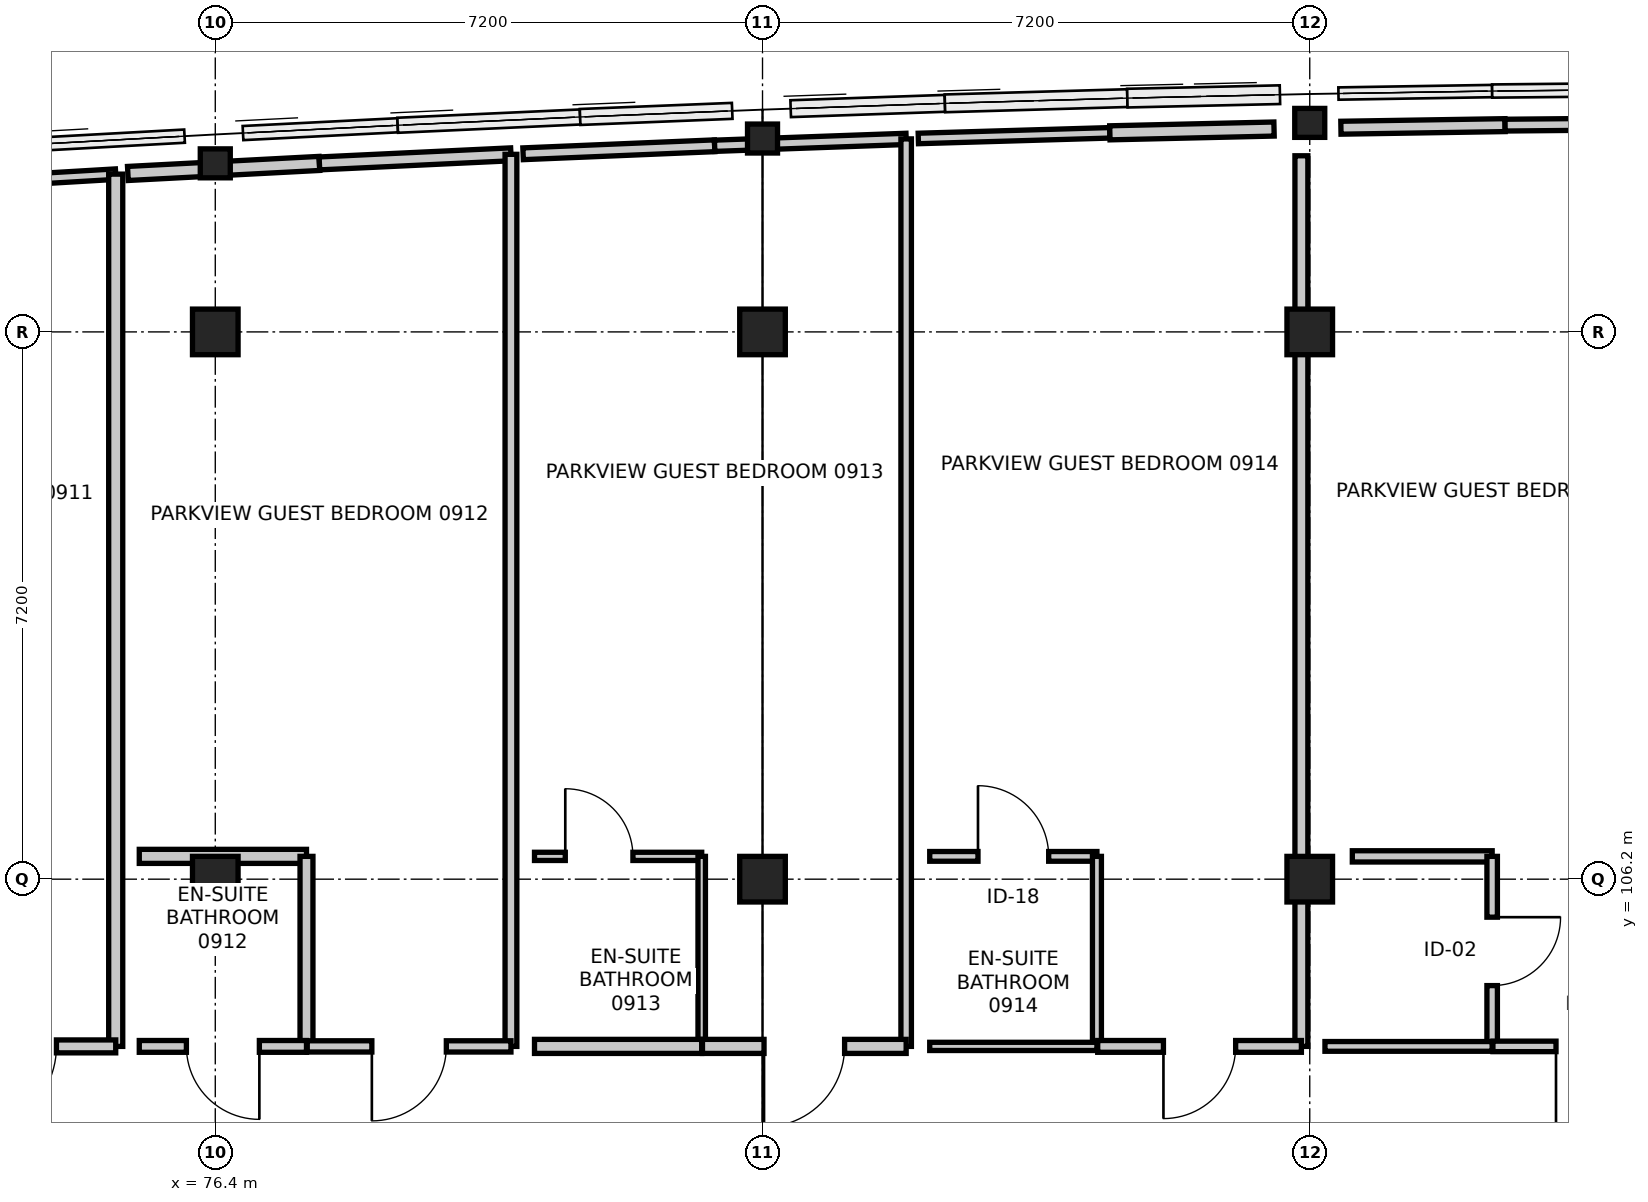
"""IFC4 building model, lengths in metres.
Left out: names, types, materials, properties, quantities, classifications, styles, units other than length and angle.
Written with IfcOpenShell. Run it as: python <this file> out.ifc"""

import sys

from ifc_helpers import new_model, si_unit, direction, frame, frame_2d, origin, origin_2d, place, context, subcontext, project, spatial, rectangle, i_section, extrude, element, fill, save


model = new_model("IFC4")
c1 = context("Model", 3, precision=1e-05, world=origin(), true_north=direction((0.0, 1.0)))
c2 = subcontext(c1, "Body", "Model", "MODEL_VIEW")
j1 = project(units=[si_unit("LENGTHUNIT", "METRE"), si_unit("PLANEANGLEUNIT", "RADIAN")], contexts=[c1])
p1 = place(None, origin())
s1 = spatial("IfcSite", under=j1, at=p1, CompositionType="ELEMENT")
p2 = place(p1, origin())
s2 = spatial("IfcBuilding", under=s1, at=p2, CompositionType="ELEMENT")
p3 = place(p2, frame((0.0, 0.0, 37.2)))
s3 = spatial("IfcBuildingStorey", under=s2, at=p3, CompositionType="ELEMENT", Elevation=37.2)
for number, where, z_axis, x_axis in (
    (1, (76.4, 106.2, 0.0), (0.0, 0.0, 1.0), (1.0, 0.0, 0.0)),
    (2, (76.4, 113.4, 0.0), (0.0, 0.0, 1.0), (1.0, 0.0, 0.0)),
):
    element("IfcColumn", number, at=place(p3, frame(where, z_axis=z_axis, x_axis=x_axis)), inside=s3, PredefinedType="COLUMN", context=c2, shape_type="SweptSolid", body=[
        extrude(rectangle(XDim=0.6, YDim=0.6, at=origin_2d()), origin(), (0.0, 0.0, 1.0), 3.6),
    ])
p4 = place(p3, frame((76.4, 115.618, 0.0), z_axis=(0.0, 0.0, 1.0), x_axis=(1.0, 0.0, 0.0)))
e3 = element("IfcColumn", 3, at=p4, inside=s3, PredefinedType="COLUMN", context=c2, shape_type="SweptSolid", body=[
    extrude(i_section(OverallWidth=0.395, OverallDepth=0.381, WebThickness=0.018, FlangeThickness=0.03, FilletRadius=0.015, at=origin_2d()), origin(), (0.0, 0.0, 1.0), 3.6),
])
for number, where, z_axis, x_axis in (
    (4, (83.6, 106.2, 0.0), (0.0, 0.0, 1.0), (1.0, 0.0, 0.0)),
    (5, (83.6, 113.4, 0.0), (0.0, 0.0, 1.0), (1.0, 0.0, 0.0)),
):
    element("IfcColumn", number, at=place(p3, frame(where, z_axis=z_axis, x_axis=x_axis)), inside=s3, PredefinedType="COLUMN", context=c2, shape_type="SweptSolid", body=[
        extrude(rectangle(XDim=0.6, YDim=0.6, at=origin_2d()), origin(), (0.0, 0.0, 1.0), 3.6),
    ])
p5 = place(p3, frame((83.6, 115.944, 0.0), z_axis=(0.0, 0.0, 1.0), x_axis=(1.0, 0.0, 0.0)))
e6 = element("IfcColumn", 6, at=p5, inside=s3, PredefinedType="COLUMN", context=c2, shape_type="SweptSolid", body=[
    extrude(i_section(OverallWidth=0.395, OverallDepth=0.381, WebThickness=0.018, FlangeThickness=0.03, FilletRadius=0.015, at=origin_2d()), origin(), (0.0, 0.0, 1.0), 3.6),
])
for number, where, z_axis, x_axis in (
    (7, (90.8, 106.2, 0.0), (0.0, 0.0, 1.0), (1.0, 0.0, 0.0)),
    (8, (90.8, 113.4, 0.0), (0.0, 0.0, 1.0), (1.0, 0.0, 0.0)),
):
    element("IfcColumn", number, at=place(p3, frame(where, z_axis=z_axis, x_axis=x_axis)), inside=s3, PredefinedType="COLUMN", context=c2, shape_type="SweptSolid", body=[
        extrude(rectangle(XDim=0.6, YDim=0.6, at=origin_2d()), origin(), (0.0, 0.0, 1.0), 3.6),
    ])
p6 = place(p3, frame((90.8, 116.15, 0.0), z_axis=(0.0, 0.0, 1.0), x_axis=(1.0, 0.0, 0.0)))
e9 = element("IfcColumn", 9, at=p6, inside=s3, PredefinedType="COLUMN", context=c2, shape_type="SweptSolid", body=[
    extrude(i_section(OverallWidth=0.395, OverallDepth=0.381, WebThickness=0.018, FlangeThickness=0.03, FilletRadius=0.015, at=origin_2d()), origin(), (0.0, 0.0, 1.0), 3.6),
])
p7 = place(p3, frame((70.05, 115.177, 0.0), z_axis=(0.0, 0.0, 1.0), x_axis=(0.998255479729, 0.059042333886, 0.0)))
e10 = element("IfcWall", 10, at=p7, inside=s3, PredefinedType="PARTITIONING", context=c2, shape_type="SweptSolid", body=[
    extrude(rectangle(XDim=5.049, YDim=0.138, at=frame_2d((2.524, 0.0))), origin(), (0.0, 0.0, 1.0), 2.956),
])
p8 = place(p3, frame((75.09, 115.476, 0.0), z_axis=(0.0, 0.0, 1.0), x_axis=(0.0, -1.0, 0.0)))
e11 = element("IfcWall", 11, at=p8, inside=s3, PredefinedType="PARTITIONING", context=c2, shape_type="SweptSolid", body=[
    extrude(rectangle(XDim=11.476, YDim=0.185, at=frame_2d((5.738, 0.0))), origin(), (0.0, 0.0, 1.0), 2.765),
])
p9 = place(p3, frame((75.09, 104.0, 0.0), z_axis=(0.0, 0.0, 1.0), x_axis=(-1.0, 0.0, 0.0)))
e12 = element("IfcWall", 12, at=p9, inside=s3, PredefinedType="PARTITIONING", context=c2, shape_type="SweptSolid", body=[
    extrude(rectangle(XDim=2.68, YDim=0.17, at=frame_2d((1.34, 0.0))), origin(), (0.0, 0.0, 1.0), 3.38),
])
p10 = place(p9, frame((0.78, 0.0, 0.0)))
e13 = element("IfcOpeningElement", 13, at=p10, cuts=e12, PredefinedType="OPENING", context=c2, shape_type="SweptSolid", body=[
    extrude(rectangle(XDim=1.12, YDim=2.2, at=frame_2d((0.56, 1.1))), frame((0.0, 0.095, 0.0), z_axis=(0.0, -1.0, 0.0), x_axis=(1.0, 0.0, 0.0)), (0.0, 0.0, 1.0), 0.19),
])
p11 = place(p3, frame((75.4, 106.5, 0.0), z_axis=(0.0, 0.0, 1.0), x_axis=(1.0, 0.0, 0.0)))
e14 = element("IfcWall", 14, at=p11, inside=s3, PredefinedType="PARTITIONING", context=c2, shape_type="SweptSolid", body=[
    extrude(rectangle(XDim=2.2, YDim=0.185, at=frame_2d((1.1, 0.0))), origin(), (0.0, 0.0, 1.0), 2.715),
])
p12 = place(p3, frame((77.6, 106.5, 0.0), z_axis=(0.0, 0.0, 1.0), x_axis=(0.0, -1.0, 0.0)))
e15 = element("IfcWall", 15, at=p12, inside=s3, PredefinedType="PARTITIONING", context=c2, shape_type="SweptSolid", body=[
    extrude(rectangle(XDim=2.5, YDim=0.17, at=frame_2d((1.25, 0.0))), origin(), (0.0, 0.0, 1.0), 2.765),
])
p13 = place(p3, frame((77.6, 104.0, 0.0), z_axis=(0.0, 0.0, 1.0), x_axis=(-1.0, 0.0, 0.0)))
e16 = element("IfcWall", 16, at=p13, inside=s3, PredefinedType="PARTITIONING", context=c2, shape_type="SweptSolid", body=[
    extrude(rectangle(XDim=2.2, YDim=0.155, at=frame_2d((1.1, 0.0))), origin(), (0.0, 0.0, 1.0), 2.715),
])
p14 = place(p13, frame((0.62, 0.0, 0.0)))
e17 = element("IfcOpeningElement", 17, at=p14, cuts=e16, PredefinedType="OPENING", context=c2, shape_type="SweptSolid", body=[
    extrude(rectangle(XDim=0.96, YDim=2.14, at=frame_2d((0.48, 1.07))), frame((0.0, 0.087, 0.0), z_axis=(0.0, -1.0, 0.0), x_axis=(1.0, 0.0, 0.0)), (0.0, 0.0, 1.0), 0.175),
])
p15 = place(p3, frame((75.25, 115.484, 0.0), z_axis=(0.0, 0.0, 1.0), x_axis=(0.998624236073, 0.052436963374, 0.0)))
e18 = element("IfcWall", 18, at=p15, inside=s3, PredefinedType="PARTITIONING", context=c2, shape_type="SweptSolid", body=[
    extrude(rectangle(XDim=2.523, YDim=0.185, at=frame_2d((1.262, 0.0))), origin(), (0.0, 0.0, 1.0), 2.956),
])
p16 = place(p3, frame((77.77, 115.617, 0.0), z_axis=(0.0, 0.0, 1.0), x_axis=(0.998875132968, 0.047418021232, 0.0)))
e19 = element("IfcWall", 19, at=p16, inside=s3, PredefinedType="PARTITIONING", context=c2, shape_type="SweptSolid", body=[
    extrude(rectangle(XDim=2.523, YDim=0.17, at=frame_2d((1.261, 0.0))), origin(), (0.0, 0.0, 1.0), 2.956),
])
p17 = place(p3, frame((80.29, 115.736, 0.0), z_axis=(0.0, 0.0, 1.0), x_axis=(0.0, -1.0, 0.0)))
e20 = element("IfcWall", 20, at=p17, inside=s3, PredefinedType="PARTITIONING", context=c2, shape_type="SweptSolid", body=[
    extrude(rectangle(XDim=11.736, YDim=0.155, at=frame_2d((5.868, 0.0))), origin(), (0.0, 0.0, 1.0), 2.765),
])
p18 = place(p3, frame((80.29, 104.0, 0.0), z_axis=(0.0, 0.0, 1.0), x_axis=(-1.0, 0.0, 0.0)))
e21 = element("IfcWall", 21, at=p18, inside=s3, PredefinedType="PARTITIONING", context=c2, shape_type="SweptSolid", body=[
    extrude(rectangle(XDim=2.68, YDim=0.148, at=frame_2d((1.34, 0.0))), origin(), (0.0, 0.0, 1.0), 3.38),
])
p19 = place(p18, frame((0.85, 0.0, 0.0)))
e22 = element("IfcOpeningElement", 22, at=p19, cuts=e21, PredefinedType="OPENING", context=c2, shape_type="SweptSolid", body=[
    extrude(rectangle(XDim=0.98, YDim=2.15, at=frame_2d((0.49, 1.075))), frame((0.0, 0.084, 0.0), z_axis=(0.0, -1.0, 0.0), x_axis=(1.0, 0.0, 0.0)), (0.0, 0.0, 1.0), 0.168),
])
p20 = place(p3, frame((80.6, 106.5, 0.0), z_axis=(0.0, 0.0, 1.0), x_axis=(1.0, 0.0, 0.0)))
e23 = element("IfcWall", 23, at=p20, inside=s3, PredefinedType="PARTITIONING", context=c2, shape_type="SweptSolid", body=[
    extrude(rectangle(XDim=2.2, YDim=0.108, at=frame_2d((1.1, 0.0))), origin(), (0.0, 0.0, 1.0), 3.38),
])
p21 = place(p20, frame((0.405, 0.0, 0.0)))
e24 = element("IfcOpeningElement", 24, at=p21, cuts=e23, PredefinedType="OPENING", context=c2, shape_type="SweptSolid", body=[
    extrude(rectangle(XDim=0.89, YDim=2.09, at=frame_2d((0.445, 1.045))), frame((0.0, 0.064, 0.0), z_axis=(0.0, -1.0, 0.0), x_axis=(1.0, 0.0, 0.0)), (0.0, 0.0, 1.0), 0.128),
])
p22 = place(p3, frame((82.8, 106.5, 0.0), z_axis=(0.0, 0.0, 1.0), x_axis=(0.0, -1.0, 0.0)))
e25 = element("IfcWall", 25, at=p22, inside=s3, PredefinedType="PARTITIONING", context=c2, shape_type="SweptSolid", body=[
    extrude(rectangle(XDim=2.5, YDim=0.098, at=frame_2d((1.25, 0.0))), origin(), (0.0, 0.0, 1.0), 2.765),
])
p23 = place(p3, frame((82.8, 104.0, 0.0), z_axis=(0.0, 0.0, 1.0), x_axis=(-1.0, 0.0, 0.0)))
e26 = element("IfcWall", 26, at=p23, inside=s3, PredefinedType="PARTITIONING", context=c2, shape_type="SweptSolid", body=[
    extrude(rectangle(XDim=2.2, YDim=0.185, at=frame_2d((1.1, 0.0))), origin(), (0.0, 0.0, 1.0), 3.38),
])
p24 = place(p3, frame((80.45, 115.743, 0.0), z_axis=(0.0, 0.0, 1.0), x_axis=(0.9991293785, 0.041719120532, 0.0)))
e27 = element("IfcWall", 27, at=p24, inside=s3, PredefinedType="PARTITIONING", context=c2, shape_type="SweptSolid", body=[
    extrude(rectangle(XDim=2.522, YDim=0.155, at=frame_2d((1.261, 0.0))), origin(), (0.0, 0.0, 1.0), 2.956),
])
p25 = place(p3, frame((82.97, 115.849, 0.0), z_axis=(0.0, 0.0, 1.0), x_axis=(0.99935468825, 0.035919452562, 0.0)))
e28 = element("IfcWall", 28, at=p25, inside=s3, PredefinedType="PARTITIONING", context=c2, shape_type="SweptSolid", body=[
    extrude(rectangle(XDim=2.522, YDim=0.148, at=frame_2d((1.261, 0.0))), origin(), (0.0, 0.0, 1.0), 2.956),
])
p26 = place(p3, frame((85.49, 115.939, 0.0), z_axis=(0.0, 0.0, 1.0), x_axis=(0.0, -1.0, 0.0)))
e29 = element("IfcWall", 29, at=p26, inside=s3, PredefinedType="PARTITIONING", context=c2, shape_type="SweptSolid", body=[
    extrude(rectangle(XDim=11.939, YDim=0.138, at=frame_2d((5.97, 0.0))), origin(), (0.0, 0.0, 1.0), 2.765),
])
p27 = place(p3, frame((85.49, 104.0, 0.0), z_axis=(0.0, 0.0, 1.0), x_axis=(-1.0, 0.0, 0.0)))
e30 = element("IfcWall", 30, at=p27, inside=s3, PredefinedType="PARTITIONING", context=c2, shape_type="SweptSolid", body=[
    extrude(rectangle(XDim=2.68, YDim=0.185, at=frame_2d((1.34, 0.0))), origin(), (0.0, 0.0, 1.0), 2.715),
])
p28 = place(p27, frame((0.81, 0.0, 0.0)))
e31 = element("IfcOpeningElement", 31, at=p28, cuts=e30, PredefinedType="OPENING", context=c2, shape_type="SweptSolid", body=[
    extrude(rectangle(XDim=1.06, YDim=2.2, at=frame_2d((0.53, 1.1))), frame((0.0, 0.103, 0.0), z_axis=(0.0, -1.0, 0.0), x_axis=(1.0, 0.0, 0.0)), (0.0, 0.0, 1.0), 0.205),
])
p29 = place(p3, frame((85.8, 106.5, 0.0), z_axis=(0.0, 0.0, 1.0), x_axis=(1.0, 0.0, 0.0)))
e32 = element("IfcWall", 32, at=p29, inside=s3, PredefinedType="PARTITIONING", context=c2, shape_type="SweptSolid", body=[
    extrude(rectangle(XDim=2.2, YDim=0.128, at=frame_2d((1.1, 0.0))), origin(), (0.0, 0.0, 1.0), 3.38),
])
p30 = place(p29, frame((0.635, 0.0, 0.0)))
e33 = element("IfcOpeningElement", 33, at=p30, cuts=e32, PredefinedType="OPENING", context=c2, shape_type="SweptSolid", body=[
    extrude(rectangle(XDim=0.93, YDim=2.13, at=frame_2d((0.465, 1.065))), frame((0.0, 0.074, 0.0), z_axis=(0.0, -1.0, 0.0), x_axis=(1.0, 0.0, 0.0)), (0.0, 0.0, 1.0), 0.148),
])
p31 = place(p3, frame((88.0, 106.5, 0.0), z_axis=(0.0, 0.0, 1.0), x_axis=(0.0, -1.0, 0.0)))
e34 = element("IfcWall", 34, at=p31, inside=s3, PredefinedType="PARTITIONING", context=c2, shape_type="SweptSolid", body=[
    extrude(rectangle(XDim=2.5, YDim=0.118, at=frame_2d((1.25, 0.0))), origin(), (0.0, 0.0, 1.0), 2.765),
])
p32 = place(p3, frame((88.0, 104.0, 0.0), z_axis=(0.0, 0.0, 1.0), x_axis=(-1.0, 0.0, 0.0)))
e35 = element("IfcWall", 35, at=p32, inside=s3, PredefinedType="PARTITIONING", context=c2, shape_type="SweptSolid", body=[
    extrude(rectangle(XDim=2.2, YDim=0.108, at=frame_2d((1.1, 0.0))), origin(), (0.0, 0.0, 1.0), 3.38),
])
p33 = place(p3, frame((85.65, 115.945, 0.0), z_axis=(0.0, 0.0, 1.0), x_axis=(0.9995665819, 0.029438891775, 0.0)))
e36 = element("IfcWall", 36, at=p33, inside=s3, PredefinedType="PARTITIONING", context=c2, shape_type="SweptSolid", body=[
    extrude(rectangle(XDim=2.521, YDim=0.138, at=frame_2d((1.26, 0.0))), origin(), (0.0, 0.0, 1.0), 2.956),
])
p34 = place(p3, frame((88.17, 116.019, 0.0), z_axis=(0.0, 0.0, 1.0), x_axis=(0.999734315018, 0.023049932218, 0.0)))
e37 = element("IfcWall", 37, at=p34, inside=s3, PredefinedType="PARTITIONING", context=c2, shape_type="SweptSolid", body=[
    extrude(rectangle(XDim=2.161, YDim=0.185, at=frame_2d((1.08, 0.0))), origin(), (0.0, 0.0, 1.0), 2.956),
])
p35 = place(p3, frame((90.69, 115.717, 0.0), z_axis=(0.0, 0.0, 1.0), x_axis=(0.0, -1.0, 0.0)))
e38 = element("IfcWall", 38, at=p35, inside=s3, PredefinedType="PARTITIONING", context=c2, shape_type="SweptSolid", body=[
    extrude(rectangle(XDim=11.717, YDim=0.17, at=frame_2d((5.859, 0.0))), origin(), (0.0, 0.0, 1.0), 2.715),
])
p36 = place(p3, frame((90.69, 104.0, 0.0), z_axis=(0.0, 0.0, 1.0), x_axis=(-1.0, 0.0, 0.0)))
e39 = element("IfcWall", 39, at=p36, inside=s3, PredefinedType="PARTITIONING", context=c2, shape_type="SweptSolid", body=[
    extrude(rectangle(XDim=2.68, YDim=0.155, at=frame_2d((1.34, 0.0))), origin(), (0.0, 0.0, 1.0), 2.715),
])
p37 = place(p36, frame((0.865, 0.0, 0.0)))
e40 = element("IfcOpeningElement", 40, at=p37, cuts=e39, PredefinedType="OPENING", context=c2, shape_type="SweptSolid", body=[
    extrude(rectangle(XDim=0.95, YDim=2.1, at=frame_2d((0.475, 1.05))), frame((0.0, 0.087, 0.0), z_axis=(0.0, -1.0, 0.0), x_axis=(1.0, 0.0, 0.0)), (0.0, 0.0, 1.0), 0.175),
])
p38 = place(p3, frame((91.36, 106.5, 0.0), z_axis=(0.0, 0.0, 1.0), x_axis=(1.0, 0.0, 0.0)))
e41 = element("IfcWall", 41, at=p38, inside=s3, PredefinedType="PARTITIONING", context=c2, shape_type="SweptSolid", body=[
    extrude(rectangle(XDim=1.84, YDim=0.148, at=frame_2d((0.92, 0.0))), origin(), (0.0, 0.0, 1.0), 3.38),
])
p39 = place(p3, frame((93.2, 106.5, 0.0), z_axis=(0.0, 0.0, 1.0), x_axis=(0.0, -1.0, 0.0)))
e42 = element("IfcWall", 42, at=p39, inside=s3, PredefinedType="PARTITIONING", context=c2, shape_type="SweptSolid", body=[
    extrude(rectangle(XDim=2.5, YDim=0.138, at=frame_2d((1.25, 0.0))), origin(), (0.0, 0.0, 1.0), 2.765),
])
p40 = place(p39, frame((0.8, 0.0, 0.0)))
e43 = element("IfcOpeningElement", 43, at=p40, cuts=e42, PredefinedType="OPENING", context=c2, shape_type="SweptSolid", body=[
    extrude(rectangle(XDim=0.9, YDim=2.08, at=frame_2d((0.45, 1.04))), frame((0.0, 0.079, 0.0), z_axis=(0.0, -1.0, 0.0), x_axis=(1.0, 0.0, 0.0)), (0.0, 0.0, 1.0), 0.158),
])
p41 = place(p3, frame((93.2, 104.0, 0.0), z_axis=(0.0, 0.0, 1.0), x_axis=(-1.0, 0.0, 0.0)))
e44 = element("IfcWall", 44, at=p41, inside=s3, PredefinedType="PARTITIONING", context=c2, shape_type="SweptSolid", body=[
    extrude(rectangle(XDim=2.2, YDim=0.128, at=frame_2d((1.1, 0.0))), origin(), (0.0, 0.0, 1.0), 2.715),
])
p42 = place(p3, frame((91.21, 116.086, 0.0), z_axis=(0.0, 0.0, 1.0), x_axis=(0.999874843241, 0.015820804482, 0.0)))
e45 = element("IfcWall", 45, at=p42, inside=s3, PredefinedType="PARTITIONING", context=c2, shape_type="SweptSolid", body=[
    extrude(rectangle(XDim=2.16, YDim=0.17, at=frame_2d((1.08, 0.0))), origin(), (0.0, 0.0, 1.0), 2.956),
])
p43 = place(p3, frame((93.37, 116.12, 0.0), z_axis=(0.0, 0.0, 1.0), x_axis=(0.999959405621, 0.009010388986, 0.0)))
e46 = element("IfcWall", 46, at=p43, inside=s3, PredefinedType="PARTITIONING", context=c2, shape_type="SweptSolid", body=[
    extrude(rectangle(XDim=2.52, YDim=0.155, at=frame_2d((1.26, 0.0))), origin(), (0.0, 0.0, 1.0), 2.956),
])
p44 = place(p3, frame((95.89, 104.0, 0.0), z_axis=(0.0, 0.0, 1.0), x_axis=(-1.0, 0.0, 0.0)))
e47 = element("IfcWall", 47, at=p44, inside=s3, PredefinedType="PARTITIONING", context=c2, shape_type="SweptSolid", body=[
    extrude(rectangle(XDim=2.68, YDim=0.138, at=frame_2d((1.34, 0.0))), origin(), (0.0, 0.0, 1.0), 3.38),
])
p45 = place(p44, frame((0.83, 0.0, 0.0)))
e48 = element("IfcOpeningElement", 48, at=p45, cuts=e47, PredefinedType="OPENING", context=c2, shape_type="SweptSolid", body=[
    extrude(rectangle(XDim=1.02, YDim=2.15, at=frame_2d((0.51, 1.075))), frame((0.0, 0.079, 0.0), z_axis=(0.0, -1.0, 0.0), x_axis=(1.0, 0.0, 0.0)), (0.0, 0.0, 1.0), 0.158),
])
p46 = place(p10, origin())
e49 = element("IfcDoor", 49, at=p46, inside=s3, OperationType="SINGLE_SWING_RIGHT", PredefinedType="DOOR", context=c2, shape_type="SweptSolid", body=[
    extrude(rectangle(XDim=1.12, YDim=2.2, at=frame_2d((0.56, 1.1))), frame((0.0, 0.025, 0.0), z_axis=(0.0, -1.0, 0.0), x_axis=(1.0, 0.0, 0.0)), (0.0, 0.0, 1.0), 0.05),
])
fill(e13, e49)
p47 = place(p14, origin())
e50 = element("IfcDoor", 50, at=p47, inside=s3, OperationType="SINGLE_SWING_LEFT", PredefinedType="DOOR", context=c2, shape_type="SweptSolid", body=[
    extrude(rectangle(XDim=0.96, YDim=2.14, at=frame_2d((0.48, 1.07))), frame((0.0, 0.025, 0.0), z_axis=(0.0, -1.0, 0.0), x_axis=(1.0, 0.0, 0.0)), (0.0, 0.0, 1.0), 0.05),
])
fill(e17, e50)
p48 = place(p19, origin())
e51 = element("IfcDoor", 51, at=p48, inside=s3, OperationType="SINGLE_SWING_RIGHT", PredefinedType="DOOR", context=c2, shape_type="SweptSolid", body=[
    extrude(rectangle(XDim=0.98, YDim=2.15, at=frame_2d((0.49, 1.075))), frame((0.0, 0.025, 0.0), z_axis=(0.0, -1.0, 0.0), x_axis=(1.0, 0.0, 0.0)), (0.0, 0.0, 1.0), 0.05),
])
fill(e22, e51)
p49 = place(p21, origin())
e52 = element("IfcDoor", 52, at=p49, inside=s3, OperationType="SINGLE_SWING_LEFT", PredefinedType="DOOR", context=c2, shape_type="SweptSolid", body=[
    extrude(rectangle(XDim=0.89, YDim=2.09, at=frame_2d((0.445, 1.045))), frame((0.0, 0.025, 0.0), z_axis=(0.0, -1.0, 0.0), x_axis=(1.0, 0.0, 0.0)), (0.0, 0.0, 1.0), 0.05),
])
fill(e24, e52)
p50 = place(p28, origin())
e53 = element("IfcDoor", 53, at=p50, inside=s3, OperationType="SINGLE_SWING_RIGHT", PredefinedType="DOOR", context=c2, shape_type="SweptSolid", body=[
    extrude(rectangle(XDim=1.06, YDim=2.2, at=frame_2d((0.53, 1.1))), frame((0.0, 0.025, 0.0), z_axis=(0.0, -1.0, 0.0), x_axis=(1.0, 0.0, 0.0)), (0.0, 0.0, 1.0), 0.05),
])
fill(e31, e53)
p51 = place(p30, origin())
e54 = element("IfcDoor", 54, at=p51, inside=s3, OperationType="SINGLE_SWING_LEFT", PredefinedType="DOOR", context=c2, shape_type="SweptSolid", body=[
    extrude(rectangle(XDim=0.93, YDim=2.13, at=frame_2d((0.465, 1.065))), frame((0.0, 0.025, 0.0), z_axis=(0.0, -1.0, 0.0), x_axis=(1.0, 0.0, 0.0)), (0.0, 0.0, 1.0), 0.05),
])
fill(e33, e54)
p52 = place(p37, origin())
e55 = element("IfcDoor", 55, at=p52, inside=s3, OperationType="SINGLE_SWING_RIGHT", PredefinedType="DOOR", context=c2, shape_type="SweptSolid", body=[
    extrude(rectangle(XDim=0.95, YDim=2.1, at=frame_2d((0.475, 1.05))), frame((0.0, 0.025, 0.0), z_axis=(0.0, -1.0, 0.0), x_axis=(1.0, 0.0, 0.0)), (0.0, 0.0, 1.0), 0.05),
])
fill(e40, e55)
p53 = place(p40, origin())
e56 = element("IfcDoor", 56, at=p53, inside=s3, OperationType="SINGLE_SWING_LEFT", PredefinedType="DOOR", context=c2, shape_type="SweptSolid", body=[
    extrude(rectangle(XDim=0.9, YDim=2.08, at=frame_2d((0.45, 1.04))), frame((0.0, 0.025, 0.0), z_axis=(0.0, -1.0, 0.0), x_axis=(1.0, 0.0, 0.0)), (0.0, 0.0, 1.0), 0.05),
])
fill(e43, e56)
p54 = place(p45, origin())
e57 = element("IfcDoor", 57, at=p54, inside=s3, OperationType="SINGLE_SWING_RIGHT", PredefinedType="DOOR", context=c2, shape_type="SweptSolid", body=[
    extrude(rectangle(XDim=1.02, YDim=2.15, at=frame_2d((0.51, 1.075))), frame((0.0, 0.025, 0.0), z_axis=(0.0, -1.0, 0.0), x_axis=(1.0, 0.0, 0.0)), (0.0, 0.0, 1.0), 0.05),
])
fill(e48, e57)
save(model, sys.argv[1])
